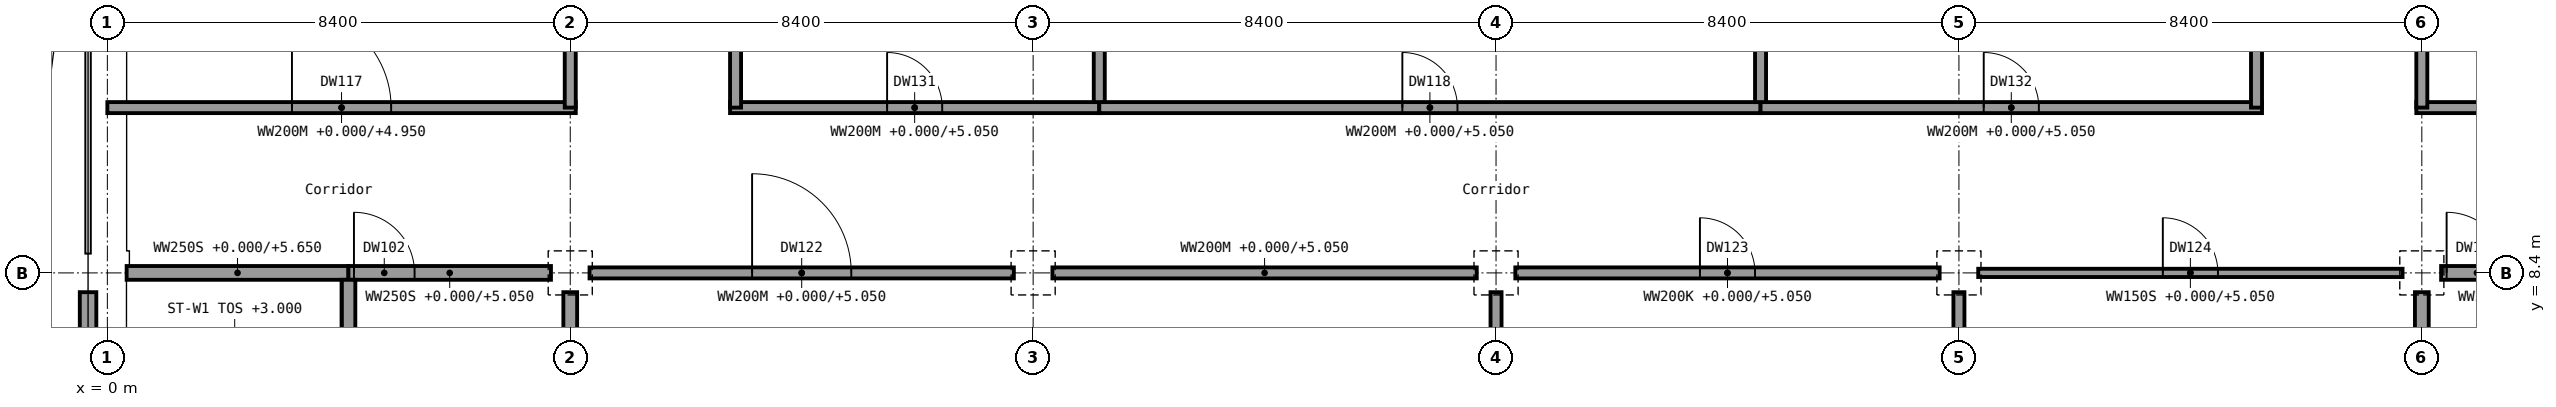
"""IFC4 building model, lengths in metres.
Left out: names, types, materials, properties, quantities, classifications, styles, units other than length and angle.
Written with IfcOpenShell. Run it as: python <this file> out.ifc"""

import sys

from ifc_helpers import new_model, si_unit, direction, frame, frame_2d, origin, origin_2d, place, context, subcontext, project, spatial, rectangle, extrude, element, fill, save


model = new_model("IFC4")
c1 = context("Model", 3, precision=1e-05, world=origin(), true_north=direction((0.0, 1.0)))
c2 = subcontext(c1, "Body", "Model", "MODEL_VIEW")
j1 = project(units=[si_unit("LENGTHUNIT", "METRE"), si_unit("PLANEANGLEUNIT", "RADIAN")], contexts=[c1])
p1 = place(None, origin())
s1 = spatial("IfcSite", under=j1, at=p1, CompositionType="ELEMENT")
p2 = place(p1, origin())
s2 = spatial("IfcBuilding", under=s1, at=p2, CompositionType="ELEMENT")
p3 = place(p2, origin())
s3 = spatial("IfcBuildingStorey", under=s2, at=p3, CompositionType="ELEMENT", Elevation=0.0)
for number, where, z_axis, x_axis in (
    (1, (0.0, 8.4, 0.0), (0.0, 0.0, 1.0), (1.0, 0.0, 0.0)),
    (2, (8.4, 8.4, 0.0), (0.0, 0.0, 1.0), (1.0, 0.0, 0.0)),
    (3, (16.8, 8.4, 0.0), (0.0, 0.0, 1.0), (1.0, 0.0, 0.0)),
    (4, (25.2, 8.4, 0.0), (0.0, 0.0, 1.0), (1.0, 0.0, 0.0)),
    (5, (33.6, 8.4, 0.0), (0.0, 0.0, 1.0), (1.0, 0.0, 0.0)),
    (6, (42.0, 8.4, 0.0), (0.0, 0.0, 1.0), (1.0, 0.0, 0.0)),
):
    element("IfcColumn", number, at=place(p3, frame(where, z_axis=z_axis, x_axis=x_axis)), inside=s3, PredefinedType="COLUMN", context=c2, shape_type="SweptSolid", body=[
        extrude(rectangle(XDim=0.7, YDim=0.7, at=origin_2d()), origin(), (0.0, 0.0, 1.0), 6.0),
    ])
p4 = place(p3, frame((-0.35, 0.35, 0.0), z_axis=(0.0, 0.0, 1.0), x_axis=(0.0, 1.0, 0.0)))
e7 = element("IfcWall", 7, at=p4, inside=s3, PredefinedType="SOLIDWALL", context=c2, shape_type="SweptSolid", body=[
    extrude(rectangle(XDim=7.7, YDim=0.3, at=frame_2d((3.85, 0.0))), origin(), (0.0, 0.0, 1.0), 5.3),
])
p5 = place(p4, frame((3.25, 0.0, 1.0)))
e8 = element("IfcOpeningElement", 8, at=p5, cuts=e7, PredefinedType="OPENING", context=c2, shape_type="SweptSolid", body=[
    extrude(rectangle(XDim=1.2, YDim=1.5, at=frame_2d((0.6, 0.75))), frame((0.0, 0.15, 0.0), z_axis=(0.0, -1.0, 0.0), x_axis=(1.0, 0.0, 0.0)), (0.0, 0.0, 1.0), 0.3),
])
p6 = place(p3, frame((0.35, 8.4, 0.0), z_axis=(0.0, 0.0, 1.0), x_axis=(1.0, 0.0, 0.0)))
e9 = element("IfcWall", 9, at=p6, inside=s3, PredefinedType="SHEAR", context=c2, shape_type="SweptSolid", body=[
    extrude(rectangle(XDim=4.025, YDim=0.25, at=frame_2d((2.012, 0.0))), origin(), (0.0, 0.0, 1.0), 5.65),
])
p7 = place(p3, frame((4.375, 8.4, 0.0), z_axis=(0.0, 0.0, 1.0), x_axis=(1.0, 0.0, 0.0)))
e10 = element("IfcWall", 10, at=p7, inside=s3, PredefinedType="SHEAR", context=c2, shape_type="SweptSolid", body=[
    extrude(rectangle(XDim=3.675, YDim=0.25, at=frame_2d((1.837, 0.0))), origin(), (0.0, 0.0, 1.0), 5.05),
])
p8 = place(p7, frame((0.1, 0.0, 0.0)))
e11 = element("IfcOpeningElement", 11, at=p8, cuts=e10, PredefinedType="OPENING", context=c2, shape_type="SweptSolid", body=[
    extrude(rectangle(XDim=1.1, YDim=2.1, at=frame_2d((0.55, 1.05))), frame((0.0, 0.125, 0.0), z_axis=(0.0, -1.0, 0.0), x_axis=(1.0, 0.0, 0.0)), (0.0, 0.0, 1.0), 0.25),
])
p9 = place(p3, frame((8.75, 8.4, 0.0), z_axis=(0.0, 0.0, 1.0), x_axis=(1.0, 0.0, 0.0)))
e12 = element("IfcWall", 12, at=p9, inside=s3, PredefinedType="PARTITIONING", context=c2, shape_type="SweptSolid", body=[
    extrude(rectangle(XDim=7.7, YDim=0.2, at=frame_2d((3.85, 0.0))), origin(), (0.0, 0.0, 1.0), 5.05),
])
p10 = place(p9, frame((2.95, 0.0, 0.0)))
e13 = element("IfcOpeningElement", 13, at=p10, cuts=e12, PredefinedType="OPENING", context=c2, shape_type="SweptSolid", body=[
    extrude(rectangle(XDim=1.8, YDim=2.1, at=frame_2d((0.9, 1.05))), frame((0.0, 0.1, 0.0), z_axis=(0.0, -1.0, 0.0), x_axis=(1.0, 0.0, 0.0)), (0.0, 0.0, 1.0), 0.2),
])
p11 = place(p3, frame((17.15, 8.4, 0.0), z_axis=(0.0, 0.0, 1.0), x_axis=(1.0, 0.0, 0.0)))
e14 = element("IfcWall", 14, at=p11, inside=s3, PredefinedType="PARTITIONING", context=c2, shape_type="SweptSolid", body=[
    extrude(rectangle(XDim=7.7, YDim=0.2, at=frame_2d((3.85, 0.0))), origin(), (0.0, 0.0, 1.0), 5.05),
])
p12 = place(p3, frame((25.55, 8.4, 0.0), z_axis=(0.0, 0.0, 1.0), x_axis=(1.0, 0.0, 0.0)))
e15 = element("IfcWall", 15, at=p12, inside=s3, PredefinedType="SOLIDWALL", context=c2, shape_type="SweptSolid", body=[
    extrude(rectangle(XDim=7.7, YDim=0.2, at=frame_2d((3.85, 0.0))), origin(), (0.0, 0.0, 1.0), 5.05),
])
p13 = place(p12, frame((3.35, 0.0, 0.0)))
e16 = element("IfcOpeningElement", 16, at=p13, cuts=e15, PredefinedType="OPENING", context=c2, shape_type="SweptSolid", body=[
    extrude(rectangle(XDim=1.0, YDim=2.1, at=frame_2d((0.5, 1.05))), frame((0.0, 0.1, 0.0), z_axis=(0.0, -1.0, 0.0), x_axis=(1.0, 0.0, 0.0)), (0.0, 0.0, 1.0), 0.2),
])
p14 = place(p3, frame((33.95, 8.4, 0.0), z_axis=(0.0, 0.0, 1.0), x_axis=(1.0, 0.0, 0.0)))
e17 = element("IfcWall", 17, at=p14, inside=s3, PredefinedType="PARTITIONING", context=c2, shape_type="SweptSolid", body=[
    extrude(rectangle(XDim=7.7, YDim=0.15, at=frame_2d((3.85, 0.0))), origin(), (0.0, 0.0, 1.0), 5.05),
])
p15 = place(p14, frame((3.35, 0.0, 0.0)))
e18 = element("IfcOpeningElement", 18, at=p15, cuts=e17, PredefinedType="OPENING", context=c2, shape_type="SweptSolid", body=[
    extrude(rectangle(XDim=1.0, YDim=2.1, at=frame_2d((0.5, 1.05))), frame((0.0, 0.075, 0.0), z_axis=(0.0, -1.0, 0.0), x_axis=(1.0, 0.0, 0.0)), (0.0, 0.0, 1.0), 0.15),
])
p16 = place(p3, frame((42.35, 8.4, 0.0), z_axis=(0.0, 0.0, 1.0), x_axis=(1.0, 0.0, 0.0)))
e19 = element("IfcWall", 19, at=p16, inside=s3, PredefinedType="SHEAR", context=c2, shape_type="SweptSolid", body=[
    extrude(rectangle(XDim=3.675, YDim=0.25, at=frame_2d((1.837, 0.0))), origin(), (0.0, 0.0, 1.0), 5.05),
])
p17 = place(p16, frame((0.1, 0.0, 0.0)))
e20 = element("IfcOpeningElement", 20, at=p17, cuts=e19, PredefinedType="OPENING", context=c2, shape_type="SweptSolid", body=[
    extrude(rectangle(XDim=1.1, YDim=2.1, at=frame_2d((0.55, 1.05))), frame((0.0, 0.125, 0.0), z_axis=(0.0, -1.0, 0.0), x_axis=(1.0, 0.0, 0.0)), (0.0, 0.0, 1.0), 0.25),
])
p18 = place(p3, frame((0.0, 11.4, 0.0), z_axis=(0.0, 0.0, 1.0), x_axis=(1.0, 0.0, 0.0)))
e21 = element("IfcWall", 21, at=p18, inside=s3, PredefinedType="PARTITIONING", context=c2, shape_type="SweptSolid", body=[
    extrude(rectangle(XDim=8.5, YDim=0.2, at=frame_2d((4.25, 0.0))), origin(), (0.0, 0.0, 1.0), 4.95),
])
p19 = place(p18, frame((3.35, 0.0, 0.0)))
e22 = element("IfcOpeningElement", 22, at=p19, cuts=e21, PredefinedType="OPENING", context=c2, shape_type="SweptSolid", body=[
    extrude(rectangle(XDim=1.8, YDim=2.1, at=frame_2d((0.9, 1.05))), frame((0.0, 0.1, 0.0), z_axis=(0.0, -1.0, 0.0), x_axis=(1.0, 0.0, 0.0)), (0.0, 0.0, 1.0), 0.2),
])
p20 = place(p3, frame((11.3, 11.4, 0.0), z_axis=(0.0, 0.0, 1.0), x_axis=(1.0, 0.0, 0.0)))
e23 = element("IfcWall", 23, at=p20, inside=s3, PredefinedType="PARTITIONING", context=c2, shape_type="SweptSolid", body=[
    extrude(rectangle(XDim=6.7, YDim=0.2, at=frame_2d((3.35, 0.0))), origin(), (0.0, 0.0, 1.0), 5.05),
])
p21 = place(p20, frame((2.85, 0.0, 0.0)))
e24 = element("IfcOpeningElement", 24, at=p21, cuts=e23, PredefinedType="OPENING", context=c2, shape_type="SweptSolid", body=[
    extrude(rectangle(XDim=1.0, YDim=2.1, at=frame_2d((0.5, 1.05))), frame((0.0, 0.1, 0.0), z_axis=(0.0, -1.0, 0.0), x_axis=(1.0, 0.0, 0.0)), (0.0, 0.0, 1.0), 0.2),
])
p22 = place(p3, frame((18.0, 11.4, 0.0), z_axis=(0.0, 0.0, 1.0), x_axis=(1.0, 0.0, 0.0)))
e25 = element("IfcWall", 25, at=p22, inside=s3, PredefinedType="PARTITIONING", context=c2, shape_type="SweptSolid", body=[
    extrude(rectangle(XDim=12.0, YDim=0.2, at=frame_2d((6.0, 0.0))), origin(), (0.0, 0.0, 1.0), 5.05),
])
p23 = place(p22, frame((5.5, 0.0, 0.0)))
e26 = element("IfcOpeningElement", 26, at=p23, cuts=e25, PredefinedType="OPENING", context=c2, shape_type="SweptSolid", body=[
    extrude(rectangle(XDim=1.0, YDim=2.1, at=frame_2d((0.5, 1.05))), frame((0.0, 0.1, 0.0), z_axis=(0.0, -1.0, 0.0), x_axis=(1.0, 0.0, 0.0)), (0.0, 0.0, 1.0), 0.2),
])
p24 = place(p3, frame((30.0, 11.4, 0.0), z_axis=(0.0, 0.0, 1.0), x_axis=(1.0, 0.0, 0.0)))
e27 = element("IfcWall", 27, at=p24, inside=s3, PredefinedType="PARTITIONING", context=c2, shape_type="SweptSolid", body=[
    extrude(rectangle(XDim=9.1, YDim=0.2, at=frame_2d((4.55, 0.0))), origin(), (0.0, 0.0, 1.0), 5.05),
])
p25 = place(p24, frame((4.05, 0.0, 0.0)))
e28 = element("IfcOpeningElement", 28, at=p25, cuts=e27, PredefinedType="OPENING", context=c2, shape_type="SweptSolid", body=[
    extrude(rectangle(XDim=1.0, YDim=2.1, at=frame_2d((0.5, 1.05))), frame((0.0, 0.1, 0.0), z_axis=(0.0, -1.0, 0.0), x_axis=(1.0, 0.0, 0.0)), (0.0, 0.0, 1.0), 0.2),
])
p26 = place(p3, frame((41.9, 11.4, 0.0), z_axis=(0.0, 0.0, 1.0), x_axis=(1.0, 0.0, 0.0)))
e29 = element("IfcWall", 29, at=p26, inside=s3, PredefinedType="PARTITIONING", context=c2, shape_type="SweptSolid", body=[
    extrude(rectangle(XDim=8.5, YDim=0.2, at=frame_2d((4.25, 0.0))), origin(), (0.0, 0.0, 1.0), 4.95),
])
p27 = place(p3, frame((4.375, 0.35, 0.0), z_axis=(0.0, 0.0, 1.0), x_axis=(0.0, 1.0, 0.0)))
e30 = element("IfcWall", 30, at=p27, inside=s3, PredefinedType="SHEAR", context=c2, shape_type="SweptSolid", body=[
    extrude(rectangle(XDim=7.925, YDim=0.25, at=frame_2d((3.962, 0.0))), origin(), (0.0, 0.0, 1.0), 5.65),
])
p28 = place(p27, frame((0.1, 0.0, 0.0)))
e31 = element("IfcOpeningElement", 31, at=p28, cuts=e30, PredefinedType="OPENING", context=c2, shape_type="SweptSolid", body=[
    extrude(rectangle(XDim=1.1, YDim=2.1, at=frame_2d((0.55, 1.05))), frame((0.0, 0.125, 0.0), z_axis=(0.0, -1.0, 0.0), x_axis=(1.0, 0.0, 0.0)), (0.0, 0.0, 1.0), 0.25),
])
p29 = place(p3, frame((8.4, 0.35, 0.0), z_axis=(0.0, 0.0, 1.0), x_axis=(0.0, 1.0, 0.0)))
e32 = element("IfcWall", 32, at=p29, inside=s3, PredefinedType="SHEAR", context=c2, shape_type="SweptSolid", body=[
    extrude(rectangle(XDim=7.7, YDim=0.25, at=frame_2d((3.85, 0.0))), origin(), (0.0, 0.0, 1.0), 5.05),
])
p30 = place(p3, frame((8.4, 11.4, 0.0), z_axis=(0.0, 0.0, 1.0), x_axis=(0.0, 1.0, 0.0)))
e33 = element("IfcWall", 33, at=p30, inside=s3, PredefinedType="PARTITIONING", context=c2, shape_type="SweptSolid", body=[
    extrude(rectangle(XDim=5.05, YDim=0.2, at=frame_2d((2.525, 0.0))), origin(), (0.0, 0.0, 1.0), 5.05),
])
p31 = place(p3, frame((11.4, 11.4, 0.0), z_axis=(0.0, 0.0, 1.0), x_axis=(0.0, 1.0, 0.0)))
e34 = element("IfcWall", 34, at=p31, inside=s3, PredefinedType="PARTITIONING", context=c2, shape_type="SweptSolid", body=[
    extrude(rectangle(XDim=5.4, YDim=0.2, at=frame_2d((2.7, 0.0))), origin(), (0.0, 0.0, 1.0), 5.05),
])
p32 = place(p3, frame((18.0, 11.5, 0.0), z_axis=(0.0, 0.0, 1.0), x_axis=(0.0, 1.0, 0.0)))
e35 = element("IfcWall", 35, at=p32, inside=s3, PredefinedType="PARTITIONING", context=c2, shape_type="SweptSolid", body=[
    extrude(rectangle(XDim=5.175, YDim=0.2, at=frame_2d((2.587, 0.0))), origin(), (0.0, 0.0, 1.0), 5.65),
])
p33 = place(p3, frame((25.2, 0.35, 0.0), z_axis=(0.0, 0.0, 1.0), x_axis=(0.0, 1.0, 0.0)))
e36 = element("IfcWall", 36, at=p33, inside=s3, PredefinedType="SOLIDWALL", context=c2, shape_type="SweptSolid", body=[
    extrude(rectangle(XDim=7.7, YDim=0.2, at=frame_2d((3.85, 0.0))), origin(), (0.0, 0.0, 1.0), 5.05),
])
p34 = place(p3, frame((30.0, 11.5, 0.0), z_axis=(0.0, 0.0, 1.0), x_axis=(0.0, 1.0, 0.0)))
e37 = element("IfcWall", 37, at=p34, inside=s3, PredefinedType="PARTITIONING", context=c2, shape_type="SweptSolid", body=[
    extrude(rectangle(XDim=5.15, YDim=0.2, at=frame_2d((2.575, 0.0))), origin(), (0.0, 0.0, 1.0), 5.65),
])
p35 = place(p3, frame((33.6, 0.35, 0.0), z_axis=(0.0, 0.0, 1.0), x_axis=(0.0, 1.0, 0.0)))
e38 = element("IfcWall", 38, at=p35, inside=s3, PredefinedType="SOLIDWALL", context=c2, shape_type="SweptSolid", body=[
    extrude(rectangle(XDim=7.7, YDim=0.2, at=frame_2d((3.85, 0.0))), origin(), (0.0, 0.0, 1.0), 5.05),
])
p36 = place(p3, frame((39.0, 11.4, 0.0), z_axis=(0.0, 0.0, 1.0), x_axis=(0.0, 1.0, 0.0)))
e39 = element("IfcWall", 39, at=p36, inside=s3, PredefinedType="PARTITIONING", context=c2, shape_type="SweptSolid", body=[
    extrude(rectangle(XDim=5.4, YDim=0.2, at=frame_2d((2.7, 0.0))), origin(), (0.0, 0.0, 1.0), 5.05),
])
p37 = place(p3, frame((42.0, 0.35, 0.0), z_axis=(0.0, 0.0, 1.0), x_axis=(0.0, 1.0, 0.0)))
e40 = element("IfcWall", 40, at=p37, inside=s3, PredefinedType="SHEAR", context=c2, shape_type="SweptSolid", body=[
    extrude(rectangle(XDim=7.7, YDim=0.25, at=frame_2d((3.85, 0.0))), origin(), (0.0, 0.0, 1.0), 5.05),
])
p38 = place(p3, frame((42.0, 11.4, 0.0), z_axis=(0.0, 0.0, 1.0), x_axis=(0.0, 1.0, 0.0)))
e41 = element("IfcWall", 41, at=p38, inside=s3, PredefinedType="PARTITIONING", context=c2, shape_type="SweptSolid", body=[
    extrude(rectangle(XDim=5.05, YDim=0.2, at=frame_2d((2.525, 0.0))), origin(), (0.0, 0.0, 1.0), 5.05),
])
p39 = place(p38, frame((2.025, 0.0, 0.0)))
e42 = element("IfcOpeningElement", 42, at=p39, cuts=e41, PredefinedType="OPENING", context=c2, shape_type="SweptSolid", body=[
    extrude(rectangle(XDim=1.0, YDim=2.1, at=frame_2d((0.5, 1.05))), frame((0.0, 0.1, 0.0), z_axis=(0.0, -1.0, 0.0), x_axis=(1.0, 0.0, 0.0)), (0.0, 0.0, 1.0), 0.2),
])
p40 = place(p8, origin())
e43 = element("IfcDoor", 43, at=p40, inside=s3, OperationType="SINGLE_SWING_LEFT", PredefinedType="DOOR", context=c2, shape_type="SweptSolid", body=[
    extrude(rectangle(XDim=1.1, YDim=2.1, at=frame_2d((0.55, 1.05))), frame((0.0, 0.025, 0.0), z_axis=(0.0, -1.0, 0.0), x_axis=(1.0, 0.0, 0.0)), (0.0, 0.0, 1.0), 0.05),
])
fill(e11, e43)
p41 = place(p17, origin())
e44 = element("IfcDoor", 44, at=p41, inside=s3, OperationType="SINGLE_SWING_LEFT", PredefinedType="DOOR", context=c2, shape_type="SweptSolid", body=[
    extrude(rectangle(XDim=1.1, YDim=2.1, at=frame_2d((0.55, 1.05))), frame((0.0, 0.025, 0.0), z_axis=(0.0, -1.0, 0.0), x_axis=(1.0, 0.0, 0.0)), (0.0, 0.0, 1.0), 0.05),
])
fill(e20, e44)
p42 = place(p19, origin())
e45 = element("IfcDoor", 45, at=p42, inside=s3, OperationType="DOUBLE_DOOR_DOUBLE_SWING", PredefinedType="DOOR", context=c2, shape_type="SweptSolid", body=[
    extrude(rectangle(XDim=1.8, YDim=2.1, at=frame_2d((0.9, 1.05))), frame((0.0, 0.025, 0.0), z_axis=(0.0, -1.0, 0.0), x_axis=(1.0, 0.0, 0.0)), (0.0, 0.0, 1.0), 0.05),
])
fill(e22, e45)
p43 = place(p23, origin())
e46 = element("IfcDoor", 46, at=p43, inside=s3, OperationType="SINGLE_SWING_LEFT", PredefinedType="DOOR", context=c2, shape_type="SweptSolid", body=[
    extrude(rectangle(XDim=1.0, YDim=2.1, at=frame_2d((0.5, 1.05))), frame((0.0, 0.025, 0.0), z_axis=(0.0, -1.0, 0.0), x_axis=(1.0, 0.0, 0.0)), (0.0, 0.0, 1.0), 0.05),
])
fill(e26, e46)
p44 = place(p10, origin())
e47 = element("IfcDoor", 47, at=p44, inside=s3, OperationType="DOUBLE_DOOR_DOUBLE_SWING", PredefinedType="DOOR", context=c2, shape_type="SweptSolid", body=[
    extrude(rectangle(XDim=1.8, YDim=2.1, at=frame_2d((0.9, 1.05))), frame((0.0, 0.025, 0.0), z_axis=(0.0, -1.0, 0.0), x_axis=(1.0, 0.0, 0.0)), (0.0, 0.0, 1.0), 0.05),
])
fill(e13, e47)
p45 = place(p13, origin())
e48 = element("IfcDoor", 48, at=p45, inside=s3, OperationType="SINGLE_SWING_LEFT", PredefinedType="DOOR", context=c2, shape_type="SweptSolid", body=[
    extrude(rectangle(XDim=1.0, YDim=2.1, at=frame_2d((0.5, 1.05))), frame((0.0, 0.025, 0.0), z_axis=(0.0, -1.0, 0.0), x_axis=(1.0, 0.0, 0.0)), (0.0, 0.0, 1.0), 0.05),
])
fill(e16, e48)
p46 = place(p15, origin())
e49 = element("IfcDoor", 49, at=p46, inside=s3, OperationType="SINGLE_SWING_LEFT", PredefinedType="DOOR", context=c2, shape_type="SweptSolid", body=[
    extrude(rectangle(XDim=1.0, YDim=2.1, at=frame_2d((0.5, 1.05))), frame((0.0, 0.025, 0.0), z_axis=(0.0, -1.0, 0.0), x_axis=(1.0, 0.0, 0.0)), (0.0, 0.0, 1.0), 0.05),
])
fill(e18, e49)
p47 = place(p21, origin())
e50 = element("IfcDoor", 50, at=p47, inside=s3, OperationType="SINGLE_SWING_LEFT", PredefinedType="DOOR", context=c2, shape_type="SweptSolid", body=[
    extrude(rectangle(XDim=1.0, YDim=2.1, at=frame_2d((0.5, 1.05))), frame((0.0, 0.025, 0.0), z_axis=(0.0, -1.0, 0.0), x_axis=(1.0, 0.0, 0.0)), (0.0, 0.0, 1.0), 0.05),
])
fill(e24, e50)
p48 = place(p25, origin())
e51 = element("IfcDoor", 51, at=p48, inside=s3, OperationType="SINGLE_SWING_LEFT", PredefinedType="DOOR", context=c2, shape_type="SweptSolid", body=[
    extrude(rectangle(XDim=1.0, YDim=2.1, at=frame_2d((0.5, 1.05))), frame((0.0, 0.025, 0.0), z_axis=(0.0, -1.0, 0.0), x_axis=(1.0, 0.0, 0.0)), (0.0, 0.0, 1.0), 0.05),
])
fill(e28, e51)
save(model, sys.argv[1])
